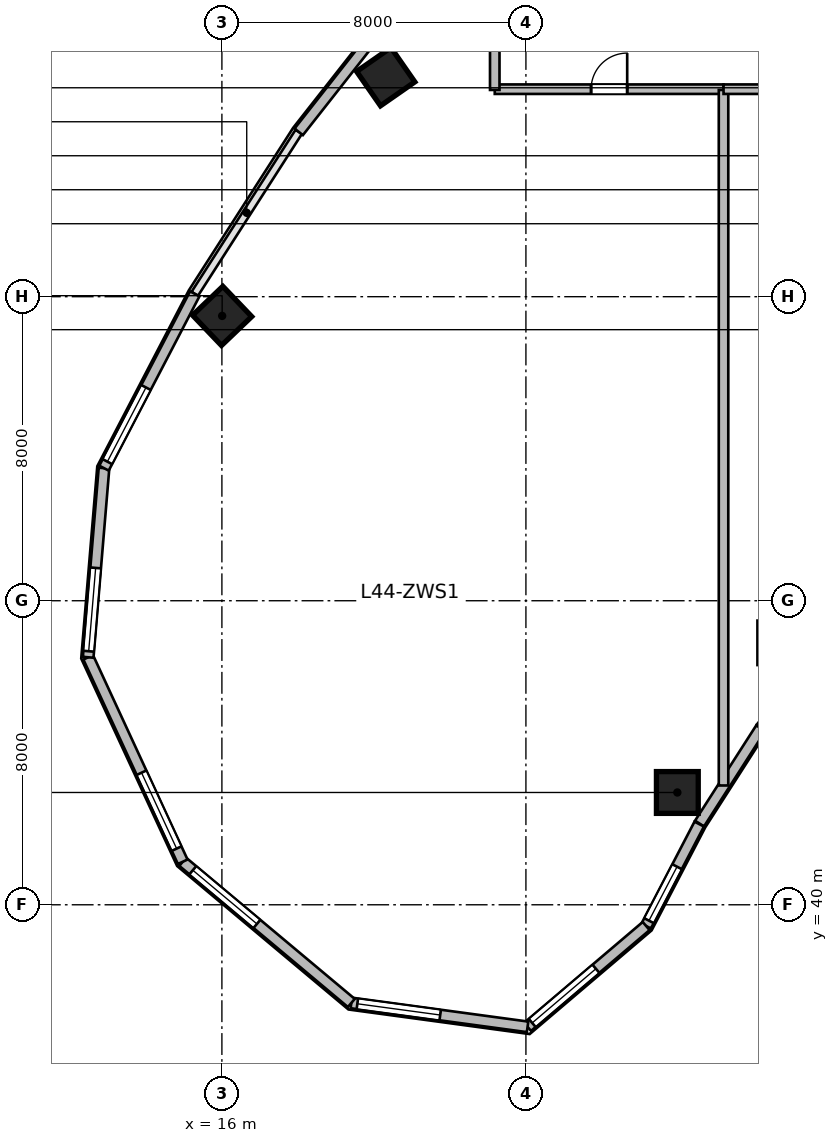
"""IFC4 building model, lengths in metres.
Left out: names, types, materials, properties, quantities, classifications, styles, units other than length and angle.
Written with IfcOpenShell. Run it as: python <this file> out.ifc"""

import sys

from ifc_helpers import new_model, si_unit, direction, frame, frame_2d, origin, origin_2d, place, context, subcontext, project, spatial, rectangle, circle, extrude, source, transform, mapped, element, fill, save


model = new_model("IFC4")
c1 = context("Model", 3, precision=1e-05, world=origin(), true_north=direction((0.0, 1.0)))
c2 = subcontext(c1, "Body", "Model", "MODEL_VIEW")
j1 = project(units=[si_unit("LENGTHUNIT", "METRE"), si_unit("PLANEANGLEUNIT", "RADIAN")], contexts=[c1])
p1 = place(None, origin())
s1 = spatial("IfcSite", under=j1, at=p1, CompositionType="ELEMENT")
p2 = place(p1, origin())
s2 = spatial("IfcBuilding", under=s1, at=p2, CompositionType="ELEMENT")
p3 = place(p2, frame((0.0, 0.0, 181.8)))
s3 = spatial("IfcBuildingStorey", under=s2, at=p3, CompositionType="ELEMENT", Elevation=181.8)
m1 = source(origin(), c2, "Body", "SweptSolid", [
    extrude(circle(Radius=0.55, at=origin_2d()), origin(), (0.0, 0.0, 1.0), 3.9),
])
p4 = place(p3, frame((27.985, 42.955, 0.0), z_axis=(0.0, 0.0, 1.0), x_axis=(-0.690756218984, 0.723087716626, 0.0)))
e1 = element("IfcColumn", 1, at=p4, inside=s3, PredefinedType="COLUMN", context=c2, shape_type="MappedRepresentation", body=[
    mapped(m1, transform((0.0, 0.0, 0.0), scale=1.0)),
])
m2 = source(origin(), c2, "Body", "SweptSolid", [
    extrude(rectangle(XDim=1.1, YDim=1.1, at=origin_2d()), origin(), (0.0, 0.0, 1.0), 3.9),
])
for number, where, z_axis, x_axis in (
    (2, (16.007, 55.494, 0.0), (0.0, 0.0, 1.0), (-0.691, 0.723, 0.0)),
    (3, (20.311, 61.789, 0.0), (0.0, 0.0, 1.0), (-0.571, 0.821, 0.0)),
):
    element("IfcColumn", number, at=place(p3, frame(where, z_axis=z_axis, x_axis=x_axis)), inside=s3, PredefinedType="COLUMN", context=c2, shape_type="MappedRepresentation", body=[
        mapped(m2, transform((0.0, 0.0, 0.0), scale=1.0)),
    ])
m3 = source(origin(), c2, "Body", "SweptSolid", [
    extrude(rectangle(XDim=2.897, YDim=0.28, at=frame_2d((1.448, 0.0))), origin(), (0.0, 0.0, 1.0), 3.65),
])
p5 = place(p3, frame((31.979, 46.936, 0.0), z_axis=(0.0, 0.0, 1.0), x_axis=(-0.618167636915, -0.786046291685, 0.0)))
e4 = element("IfcWall", 4, at=p5, inside=s3, PredefinedType="SOLIDWALL", context=c2, shape_type="MappedRepresentation", body=[
    mapped(m3, transform((0.0, 0.0, 0.0), scale=1.0)),
])
m4 = source(origin(), c2, "Body", "SweptSolid", [
    extrude(rectangle(XDim=2.981, YDim=0.28, at=frame_2d((1.49, 0.0))), origin(), (0.0, 0.0, 1.0), 3.65),
])
p6 = place(p3, frame((30.179, 44.645, 0.0), z_axis=(0.0, 0.0, 1.0), x_axis=(-0.540194451908, -0.841540227278, 0.0)))
e5 = element("IfcWall", 5, at=p6, inside=s3, PredefinedType="SOLIDWALL", context=c2, shape_type="MappedRepresentation", body=[
    mapped(m4, transform((0.0, 0.0, 0.0), scale=1.0)),
])
m5 = source(origin(), c2, "Body", "SweptSolid", [
    extrude(rectangle(XDim=3.024, YDim=0.28, at=frame_2d((1.512, 0.0))), origin(), (0.0, 0.0, 1.0), 3.65),
])
p7 = place(p3, frame((28.561, 42.123, 0.0), z_axis=(0.0, 0.0, 1.0), x_axis=(-0.461718746531, -0.887026380161, 0.0)))
e6 = element("IfcWall", 6, at=p7, inside=s3, PredefinedType="SOLIDWALL", context=c2, shape_type="MappedRepresentation", body=[
    mapped(m5, transform((0.0, 0.0, 0.0), scale=1.0)),
])
p8 = place(p7, frame((1.264, 0.0, 0.95)))
e7 = element("IfcOpeningElement", 7, at=p8, cuts=e6, PredefinedType="OPENING", context=c2, shape_type="SweptSolid", body=[
    extrude(rectangle(XDim=1.6, YDim=1.9, at=frame_2d((0.8, 0.95))), frame((0.0, 0.15, 0.0), z_axis=(0.0, -1.0, 0.0), x_axis=(1.0, 0.0, 0.0)), (0.0, 0.0, 1.0), 0.3),
])
m6 = source(origin(), c2, "Body", "SweptSolid", [
    extrude(rectangle(XDim=4.096, YDim=0.28, at=frame_2d((2.048, 0.0))), origin(), (0.0, 0.0, 1.0), 3.65),
])
p9 = place(p3, frame((27.164, 39.44, 0.0), z_axis=(0.0, 0.0, 1.0), x_axis=(-0.761926081737, -0.647663991564, 0.0)))
e8 = element("IfcWall", 8, at=p9, inside=s3, PredefinedType="SOLIDWALL", context=c2, shape_type="MappedRepresentation", body=[
    mapped(m6, transform((0.0, 0.0, 0.0), scale=1.0)),
])
p10 = place(p9, frame((1.736, 0.0, 0.95)))
e9 = element("IfcOpeningElement", 9, at=p10, cuts=e8, PredefinedType="OPENING", context=c2, shape_type="SweptSolid", body=[
    extrude(rectangle(XDim=2.2, YDim=2.1, at=frame_2d((1.1, 1.05))), frame((0.0, 0.15, 0.0), z_axis=(0.0, -1.0, 0.0), x_axis=(1.0, 0.0, 0.0)), (0.0, 0.0, 1.0), 0.3),
])
m7 = source(origin(), c2, "Body", "SweptSolid", [
    extrude(rectangle(XDim=4.68, YDim=0.28, at=frame_2d((2.34, 0.0))), origin(), (0.0, 0.0, 1.0), 3.65),
])
p11 = place(p3, frame((24.043, 36.788, 0.0), z_axis=(0.0, 0.0, 1.0), x_axis=(-0.990931146435, 0.134370618162, 0.0)))
e10 = element("IfcWall", 10, at=p11, inside=s3, PredefinedType="SOLIDWALL", context=c2, shape_type="MappedRepresentation", body=[
    mapped(m7, transform((0.0, 0.0, 0.0), scale=1.0)),
])
p12 = place(p11, frame((2.32, 0.0, 0.95)))
e11 = element("IfcOpeningElement", 11, at=p12, cuts=e10, PredefinedType="OPENING", context=c2, shape_type="SweptSolid", body=[
    extrude(rectangle(XDim=2.2, YDim=2.1, at=frame_2d((1.1, 1.05))), frame((0.0, 0.15, 0.0), z_axis=(0.0, -1.0, 0.0), x_axis=(1.0, 0.0, 0.0)), (0.0, 0.0, 1.0), 0.3),
])
m8 = source(origin(), c2, "Body", "SweptSolid", [
    extrude(rectangle(XDim=5.786, YDim=0.28, at=frame_2d((2.893, 0.0))), origin(), (0.0, 0.0, 1.0), 3.65),
])
p13 = place(p3, frame((19.406, 37.417, 0.0), z_axis=(0.0, 0.0, 1.0), x_axis=(-0.766711306852, 0.641992034176, 0.0)))
e12 = element("IfcWall", 12, at=p13, inside=s3, PredefinedType="SOLIDWALL", context=c2, shape_type="MappedRepresentation", body=[
    mapped(m8, transform((0.0, 0.0, 0.0), scale=1.0)),
])
p14 = place(p13, frame((3.24, 0.0, 0.95)))
e13 = element("IfcOpeningElement", 13, at=p14, cuts=e12, PredefinedType="OPENING", context=c2, shape_type="SweptSolid", body=[
    extrude(rectangle(XDim=2.2, YDim=2.1, at=frame_2d((1.1, 1.05))), frame((0.0, 0.15, 0.0), z_axis=(0.0, -1.0, 0.0), x_axis=(1.0, 0.0, 0.0)), (0.0, 0.0, 1.0), 0.3),
])
m9 = source(origin(), c2, "Body", "SweptSolid", [
    extrude(rectangle(XDim=5.927, YDim=0.28, at=frame_2d((2.964, 0.0))), origin(), (0.0, 0.0, 1.0), 3.65),
])
p15 = place(p3, frame((14.969, 41.131, 0.0), z_axis=(0.0, 0.0, 1.0), x_axis=(-0.419656204795, 0.907683132914, 0.0)))
e14 = element("IfcWall", 14, at=p15, inside=s3, PredefinedType="SOLIDWALL", context=c2, shape_type="MappedRepresentation", body=[
    mapped(m9, transform((0.0, 0.0, 0.0), scale=1.0)),
])
p16 = place(p15, frame((0.382, 0.0, 0.95)))
e15 = element("IfcOpeningElement", 15, at=p16, cuts=e14, PredefinedType="OPENING", context=c2, shape_type="SweptSolid", body=[
    extrude(rectangle(XDim=2.2, YDim=2.1, at=frame_2d((1.1, 1.05))), frame((0.0, 0.15, 0.0), z_axis=(0.0, -1.0, 0.0), x_axis=(1.0, 0.0, 0.0)), (0.0, 0.0, 1.0), 0.3),
])
m10 = source(origin(), c2, "Body", "SweptSolid", [
    extrude(rectangle(XDim=4.994, YDim=0.28, at=frame_2d((2.497, 0.0))), origin(), (0.0, 0.0, 1.0), 3.65),
])
p17 = place(p3, frame((12.481, 46.512, 0.0), z_axis=(0.0, 0.0, 1.0), x_axis=(0.083344839916, 0.996520766296, 0.0)))
e16 = element("IfcWall", 16, at=p17, inside=s3, PredefinedType="SOLIDWALL", context=c2, shape_type="MappedRepresentation", body=[
    mapped(m10, transform((0.0, 0.0, 0.0), scale=1.0)),
])
p18 = place(p17, frame((0.16, 0.0, 0.95)))
e17 = element("IfcOpeningElement", 17, at=p18, cuts=e16, PredefinedType="OPENING", context=c2, shape_type="SweptSolid", body=[
    extrude(rectangle(XDim=2.2, YDim=2.1, at=frame_2d((1.1, 1.05))), frame((0.0, 0.15, 0.0), z_axis=(0.0, -1.0, 0.0), x_axis=(1.0, 0.0, 0.0)), (0.0, 0.0, 1.0), 0.3),
])
m11 = source(origin(), c2, "Body", "SweptSolid", [
    extrude(rectangle(XDim=5.171, YDim=0.28, at=frame_2d((2.585, 0.0))), origin(), (0.0, 0.0, 1.0), 3.65),
])
p19 = place(p3, frame((12.898, 51.489, 0.0), z_axis=(0.0, 0.0, 1.0), x_axis=(0.461752581363, 0.887008767491, 0.0)))
e18 = element("IfcWall", 18, at=p19, inside=s3, PredefinedType="SOLIDWALL", context=c2, shape_type="MappedRepresentation", body=[
    mapped(m11, transform((0.0, 0.0, 0.0), scale=1.0)),
])
p20 = place(p19, frame((0.193, 0.0, 0.95)))
e19 = element("IfcOpeningElement", 19, at=p20, cuts=e18, PredefinedType="OPENING", context=c2, shape_type="SweptSolid", body=[
    extrude(rectangle(XDim=2.2, YDim=2.1, at=frame_2d((1.1, 1.05))), frame((0.0, 0.15, 0.0), z_axis=(0.0, -1.0, 0.0), x_axis=(1.0, 0.0, 0.0)), (0.0, 0.0, 1.0), 0.3),
])
m12 = source(origin(), c2, "Body", "SweptSolid", [
    extrude(rectangle(XDim=4.922, YDim=0.28, at=frame_2d((2.461, 0.0))), origin(), (0.0, 0.0, 1.0), 3.65),
])
p21 = place(p3, frame((18.021, 60.338, 0.0), z_axis=(0.0, 0.0, 1.0), x_axis=(0.61817639101, 0.786039407153, 0.0)))
e20 = element("IfcWall", 20, at=p21, inside=s3, PredefinedType="SOLIDWALL", context=c2, shape_type="MappedRepresentation", body=[
    mapped(m12, transform((0.0, 0.0, 0.0), scale=1.0)),
])
m13 = source(origin(), c2, "Body", "SweptSolid", [
    extrude(rectangle(XDim=6.02, YDim=0.25, at=frame_2d((3.01, 0.0))), origin(), (0.0, 0.0, 1.0), 3.65),
])
p22 = place(p3, frame((23.18, 61.46, 0.0), z_axis=(0.0, 0.0, 1.0), x_axis=(1.0, 0.0, 0.0)))
e21 = element("IfcWall", 21, at=p22, inside=s3, PredefinedType="PARTITIONING", context=c2, shape_type="MappedRepresentation", body=[
    mapped(m13, transform((0.0, 0.0, 0.0), scale=1.0)),
])
p23 = place(p22, frame((2.535, 0.0, 0.0)))
e22 = element("IfcOpeningElement", 22, at=p23, cuts=e21, PredefinedType="OPENING", context=c2, shape_type="SweptSolid", body=[
    extrude(rectangle(XDim=0.95, YDim=2.1, at=frame_2d((0.475, 1.05))), frame((0.0, 0.135, 0.0), z_axis=(0.0, -1.0, 0.0), x_axis=(1.0, 0.0, 0.0)), (0.0, 0.0, 1.0), 0.27),
])
m14 = source(origin(), c2, "Body", "SweptSolid", [
    extrude(rectangle(XDim=18.301, YDim=0.25, at=frame_2d((9.15, 0.0))), origin(), (0.0, 0.0, 1.0), 2.942),
])
p24 = place(p3, frame((29.2, 43.139, 0.0), z_axis=(0.0, 0.0, 1.0), x_axis=(0.0, 1.0, 0.0)))
e23 = element("IfcWall", 23, at=p24, inside=s3, PredefinedType="PARTITIONING", context=c2, shape_type="MappedRepresentation", body=[
    mapped(m14, transform((0.0, 0.0, 0.0), scale=1.0)),
])
m15 = source(origin(), c2, "Body", "SweptSolid", [
    extrude(rectangle(XDim=5.2, YDim=0.25, at=frame_2d((2.6, 0.0))), origin(), (0.0, 0.0, 1.0), 3.65),
])
p25 = place(p3, frame((29.2, 61.46, 0.0), z_axis=(0.0, 0.0, 1.0), x_axis=(1.0, 0.0, 0.0)))
e24 = element("IfcWall", 24, at=p25, inside=s3, PredefinedType="PARTITIONING", context=c2, shape_type="MappedRepresentation", body=[
    mapped(m15, transform((0.0, 0.0, 0.0), scale=1.0)),
])
p26 = place(p25, frame((2.125, 0.0, 0.0)))
e25 = element("IfcOpeningElement", 25, at=p26, cuts=e24, PredefinedType="OPENING", context=c2, shape_type="SweptSolid", body=[
    extrude(rectangle(XDim=0.95, YDim=2.1, at=frame_2d((0.475, 1.05))), frame((0.0, 0.135, 0.0), z_axis=(0.0, -1.0, 0.0), x_axis=(1.0, 0.0, 0.0)), (0.0, 0.0, 1.0), 0.27),
])
m16 = source(origin(), c2, "Body", "SweptSolid", [
    extrude(rectangle(XDim=2.62, YDim=0.25, at=frame_2d((1.31, 0.0))), origin(), (0.0, 0.0, 1.0), 3.65),
])
p27 = place(p3, frame((23.18, 61.44, 0.0), z_axis=(0.0, 0.0, 1.0), x_axis=(0.0, 1.0, 0.0)))
e26 = element("IfcWall", 26, at=p27, inside=s3, PredefinedType="PARTITIONING", context=c2, shape_type="MappedRepresentation", body=[
    mapped(m16, transform((0.0, 0.0, 0.0), scale=1.0)),
])
m17 = source(origin(), c2, "Body", "SweptSolid", [
    extrude(rectangle(XDim=1.6, YDim=1.9, at=frame_2d((0.8, 0.95))), frame((0.0, 0.03, 0.0), z_axis=(0.0, -1.0, 0.0), x_axis=(1.0, 0.0, 0.0)), (0.0, 0.0, 1.0), 0.06),
])
p28 = place(p8, origin())
e27 = element("IfcWindow", 27, at=p28, inside=s3, PartitioningType="SINGLE_PANEL", PredefinedType="WINDOW", context=c2, shape_type="MappedRepresentation", body=[
    mapped(m17, transform((0.0, 0.0, 0.0), scale=1.0)),
])
fill(e7, e27)
m18 = source(origin(), c2, "Body", "SweptSolid", [
    extrude(rectangle(XDim=2.2, YDim=2.1, at=frame_2d((1.1, 1.05))), frame((0.0, 0.03, 0.0), z_axis=(0.0, -1.0, 0.0), x_axis=(1.0, 0.0, 0.0)), (0.0, 0.0, 1.0), 0.06),
])
p29 = place(p10, origin())
e28 = element("IfcWindow", 28, at=p29, inside=s3, PartitioningType="TRIPLE_PANEL_VERTICAL", PredefinedType="WINDOW", context=c2, shape_type="MappedRepresentation", body=[
    mapped(m18, transform((0.0, 0.0, 0.0), scale=1.0)),
])
fill(e9, e28)
p30 = place(p12, origin())
e29 = element("IfcWindow", 29, at=p30, inside=s3, PartitioningType="TRIPLE_PANEL_VERTICAL", PredefinedType="WINDOW", context=c2, shape_type="MappedRepresentation", body=[
    mapped(m18, transform((0.0, 0.0, 0.0), scale=1.0)),
])
fill(e11, e29)
p31 = place(p14, origin())
e30 = element("IfcWindow", 30, at=p31, inside=s3, PartitioningType="TRIPLE_PANEL_VERTICAL", PredefinedType="WINDOW", context=c2, shape_type="MappedRepresentation", body=[
    mapped(m18, transform((0.0, 0.0, 0.0), scale=1.0)),
])
fill(e13, e30)
p32 = place(p16, origin())
e31 = element("IfcWindow", 31, at=p32, inside=s3, PartitioningType="TRIPLE_PANEL_VERTICAL", PredefinedType="WINDOW", context=c2, shape_type="MappedRepresentation", body=[
    mapped(m18, transform((0.0, 0.0, 0.0), scale=1.0)),
])
fill(e15, e31)
p33 = place(p18, origin())
e32 = element("IfcWindow", 32, at=p33, inside=s3, PartitioningType="TRIPLE_PANEL_VERTICAL", PredefinedType="WINDOW", context=c2, shape_type="MappedRepresentation", body=[
    mapped(m18, transform((0.0, 0.0, 0.0), scale=1.0)),
])
fill(e17, e32)
p34 = place(p20, origin())
e33 = element("IfcWindow", 33, at=p34, inside=s3, PartitioningType="TRIPLE_PANEL_VERTICAL", PredefinedType="WINDOW", context=c2, shape_type="MappedRepresentation", body=[
    mapped(m18, transform((0.0, 0.0, 0.0), scale=1.0)),
])
fill(e19, e33)
m19 = source(origin(), c2, "Body", "SweptSolid", [
    extrude(rectangle(XDim=0.95, YDim=2.1, at=frame_2d((0.475, 1.05))), frame((0.0, 0.025, 0.0), z_axis=(0.0, -1.0, 0.0), x_axis=(1.0, 0.0, 0.0)), (0.0, 0.0, 1.0), 0.05),
])
p35 = place(p23, origin())
e34 = element("IfcDoor", 34, at=p35, inside=s3, OperationType="SINGLE_SWING_RIGHT", PredefinedType="DOOR", context=c2, shape_type="MappedRepresentation", body=[
    mapped(m19, transform((0.0, 0.0, 0.0), scale=1.0)),
])
fill(e22, e34)
save(model, sys.argv[1])
